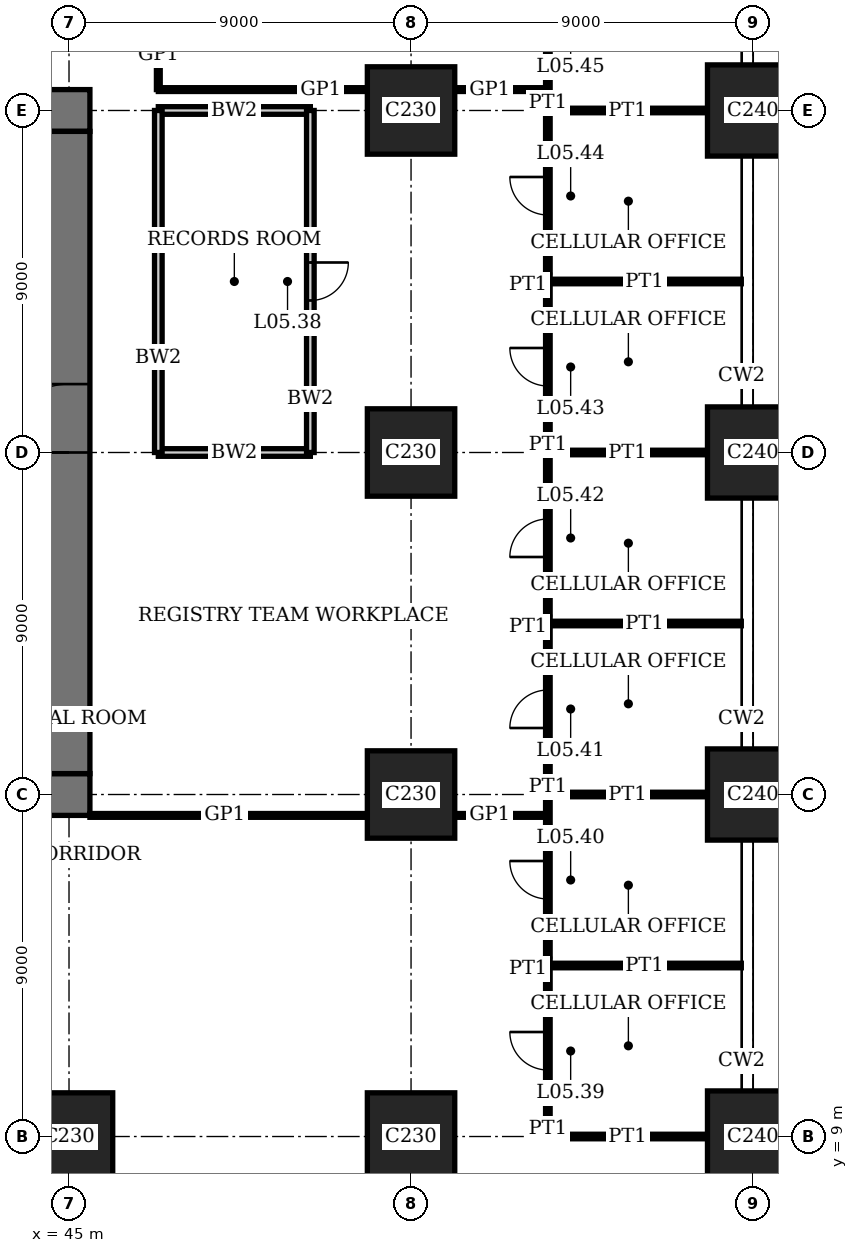
"""IFC4 building model, lengths in metres.
Left out: names, types, materials, properties, quantities, classifications, styles, units other than length and angle.
Written with IfcOpenShell. Run it as: python <this file> out.ifc"""

import sys

from ifc_helpers import new_model, si_unit, direction, frame, frame_2d, origin, origin_2d, place, context, subcontext, project, spatial, rectangle, extrude, element, fill, save


model = new_model("IFC4")
c1 = context("Model", 3, precision=1e-05, world=origin(), true_north=direction((0.0, 1.0)))
c2 = subcontext(c1, "Body", "Model", "MODEL_VIEW")
j1 = project(units=[si_unit("LENGTHUNIT", "METRE"), si_unit("PLANEANGLEUNIT", "RADIAN")], contexts=[c1])
p1 = place(None, origin())
s1 = spatial("IfcSite", under=j1, at=p1, CompositionType="ELEMENT")
p2 = place(p1, origin())
s2 = spatial("IfcBuilding", under=s1, at=p2, CompositionType="ELEMENT")
p3 = place(p2, frame((0.0, 0.0, 23.8)))
s3 = spatial("IfcBuildingStorey", under=s2, at=p3, CompositionType="ELEMENT", Elevation=23.8)
for number, where, z_axis, x_axis in (
    (1, (45.0, 9.0, 0.0), (0.0, 0.0, 1.0), (1.0, 0.0, 0.0)),
    (2, (54.0, 9.0, 0.0), (0.0, 0.0, 1.0), (1.0, 0.0, 0.0)),
    (3, (54.0, 18.0, 0.0), (0.0, 0.0, 1.0), (1.0, 0.0, 0.0)),
    (4, (54.0, 27.0, 0.0), (0.0, 0.0, 1.0), (1.0, 0.0, 0.0)),
    (5, (54.0, 36.0, 0.0), (0.0, 0.0, 1.0), (1.0, 0.0, 0.0)),
):
    element("IfcColumn", number, at=place(p3, frame(where, z_axis=z_axis, x_axis=x_axis)), inside=s3, PredefinedType="COLUMN", context=c2, shape_type="SweptSolid", body=[
        extrude(rectangle(XDim=2.3, YDim=2.3, at=origin_2d()), origin(), (0.0, 0.0, 1.0), 4.0),
    ])
for number, where, z_axis, x_axis in (
    (6, (63.0, 9.0, 0.0), (0.0, 0.0, 1.0), (1.0, 0.0, 0.0)),
    (7, (63.0, 18.0, 0.0), (0.0, 0.0, 1.0), (1.0, 0.0, 0.0)),
    (8, (63.0, 27.0, 0.0), (0.0, 0.0, 1.0), (1.0, 0.0, 0.0)),
    (9, (63.0, 36.0, 0.0), (0.0, 0.0, 1.0), (1.0, 0.0, 0.0)),
):
    element("IfcColumn", number, at=place(p3, frame(where, z_axis=z_axis, x_axis=x_axis)), inside=s3, PredefinedType="COLUMN", context=c2, shape_type="SweptSolid", body=[
        extrude(rectangle(XDim=2.4, YDim=2.4, at=origin_2d()), origin(), (0.0, 0.0, 1.0), 4.0),
    ])
p4 = place(p3, frame((17.45, 18.0, 0.0), z_axis=(0.0, 0.0, 1.0), x_axis=(1.0, 0.0, 0.0)))
e10 = element("IfcWall", 10, at=p4, inside=s3, PredefinedType="SHEAR", context=c2, shape_type="SweptSolid", body=[
    extrude(rectangle(XDim=28.1, YDim=1.1, at=frame_2d((14.05, 0.0))), origin(), (0.0, 0.0, 1.0), 4.0),
])
p5 = place(p4, frame((11.55, 0.0, 0.0)))
e11 = element("IfcOpeningElement", 11, at=p5, cuts=e10, PredefinedType="OPENING", context=c2, shape_type="SweptSolid", body=[
    extrude(rectangle(XDim=1.0, YDim=2.4, at=frame_2d((0.5, 1.2))), frame((0.0, 0.56, 0.0), z_axis=(0.0, -1.0, 0.0), x_axis=(1.0, 0.0, 0.0)), (0.0, 0.0, 1.0), 1.12),
])
p6 = place(p4, frame((16.55, 0.0, 0.0)))
e12 = element("IfcOpeningElement", 12, at=p6, cuts=e10, PredefinedType="OPENING", context=c2, shape_type="SweptSolid", body=[
    extrude(rectangle(XDim=1.0, YDim=2.4, at=frame_2d((0.5, 1.2))), frame((0.0, 0.56, 0.0), z_axis=(0.0, -1.0, 0.0), x_axis=(1.0, 0.0, 0.0)), (0.0, 0.0, 1.0), 1.12),
])
p7 = place(p4, frame((20.0, 0.0, 0.0)))
e13 = element("IfcOpeningElement", 13, at=p7, cuts=e10, PredefinedType="OPENING", context=c2, shape_type="SweptSolid", body=[
    extrude(rectangle(XDim=1.1, YDim=2.4, at=frame_2d((0.55, 1.2))), frame((0.0, 0.56, 0.0), z_axis=(0.0, -1.0, 0.0), x_axis=(1.0, 0.0, 0.0)), (0.0, 0.0, 1.0), 1.12),
])
p8 = place(p4, frame((24.05, 0.0, 0.0)))
e14 = element("IfcOpeningElement", 14, at=p8, cuts=e10, PredefinedType="OPENING", context=c2, shape_type="SweptSolid", body=[
    extrude(rectangle(XDim=1.0, YDim=2.4, at=frame_2d((0.5, 1.2))), frame((0.0, 0.56, 0.0), z_axis=(0.0, -1.0, 0.0), x_axis=(1.0, 0.0, 0.0)), (0.0, 0.0, 1.0), 1.12),
])
p9 = place(p3, frame((45.55, 36.0, 0.0), z_axis=(0.0, 0.0, 1.0), x_axis=(-1.0, 0.0, 0.0)))
e15 = element("IfcWall", 15, at=p9, inside=s3, PredefinedType="SHEAR", context=c2, shape_type="SweptSolid", body=[
    extrude(rectangle(XDim=28.1, YDim=1.1, at=frame_2d((14.05, 0.0))), origin(), (0.0, 0.0, 1.0), 4.0),
])
p10 = place(p9, frame((11.55, 0.0, 0.0)))
e16 = element("IfcOpeningElement", 16, at=p10, cuts=e15, PredefinedType="OPENING", context=c2, shape_type="SweptSolid", body=[
    extrude(rectangle(XDim=1.0, YDim=2.4, at=frame_2d((0.5, 1.2))), frame((0.0, 0.56, 0.0), z_axis=(0.0, -1.0, 0.0), x_axis=(1.0, 0.0, 0.0)), (0.0, 0.0, 1.0), 1.12),
])
p11 = place(p9, frame((16.55, 0.0, 0.0)))
e17 = element("IfcOpeningElement", 17, at=p11, cuts=e15, PredefinedType="OPENING", context=c2, shape_type="SweptSolid", body=[
    extrude(rectangle(XDim=1.0, YDim=2.4, at=frame_2d((0.5, 1.2))), frame((0.0, 0.56, 0.0), z_axis=(0.0, -1.0, 0.0), x_axis=(1.0, 0.0, 0.0)), (0.0, 0.0, 1.0), 1.12),
])
p12 = place(p9, frame((20.0, 0.0, 0.0)))
e18 = element("IfcOpeningElement", 18, at=p12, cuts=e15, PredefinedType="OPENING", context=c2, shape_type="SweptSolid", body=[
    extrude(rectangle(XDim=1.1, YDim=2.4, at=frame_2d((0.55, 1.2))), frame((0.0, 0.56, 0.0), z_axis=(0.0, -1.0, 0.0), x_axis=(1.0, 0.0, 0.0)), (0.0, 0.0, 1.0), 1.12),
])
p13 = place(p9, frame((24.05, 0.0, 0.0)))
e19 = element("IfcOpeningElement", 19, at=p13, cuts=e15, PredefinedType="OPENING", context=c2, shape_type="SweptSolid", body=[
    extrude(rectangle(XDim=1.0, YDim=2.4, at=frame_2d((0.5, 1.2))), frame((0.0, 0.56, 0.0), z_axis=(0.0, -1.0, 0.0), x_axis=(1.0, 0.0, 0.0)), (0.0, 0.0, 1.0), 1.12),
])
p14 = place(p3, frame((45.0, 18.55, 0.0), z_axis=(0.0, 0.0, 1.0), x_axis=(0.0, 1.0, 0.0)))
e20 = element("IfcWall", 20, at=p14, inside=s3, PredefinedType="SHEAR", context=c2, shape_type="SweptSolid", body=[
    extrude(rectangle(XDim=16.9, YDim=1.1, at=frame_2d((8.45, 0.0))), origin(), (0.0, 0.0, 1.0), 4.0),
])
p15 = place(p14, frame((8.45, 0.0, 0.0)))
e21 = element("IfcOpeningElement", 21, at=p15, cuts=e20, PredefinedType="OPENING", context=c2, shape_type="SweptSolid", body=[
    extrude(rectangle(XDim=1.8, YDim=2.4, at=frame_2d((0.9, 1.2))), frame((0.0, 0.56, 0.0), z_axis=(0.0, -1.0, 0.0), x_axis=(1.0, 0.0, 0.0)), (0.0, 0.0, 1.0), 1.12),
])
p16 = place(p3, frame((57.6, 9.0, 0.0), z_axis=(0.0, 0.0, 1.0), x_axis=(1.0, 0.0, 0.0)))
e22 = element("IfcWall", 22, at=p16, inside=s3, PredefinedType="PARTITIONING", context=c2, shape_type="SweptSolid", body=[
    extrude(rectangle(XDim=4.2, YDim=0.12, at=frame_2d((2.1, 0.0))), origin(), (0.0, 0.0, 1.0), 3.05),
])
p17 = place(p3, frame((57.6, 13.5, 0.0), z_axis=(0.0, 0.0, 1.0), x_axis=(1.0, 0.0, 0.0)))
e23 = element("IfcWall", 23, at=p17, inside=s3, PredefinedType="PARTITIONING", context=c2, shape_type="SweptSolid", body=[
    extrude(rectangle(XDim=5.09, YDim=0.12, at=frame_2d((2.545, 0.0))), origin(), (0.0, 0.0, 1.0), 3.1),
])
p18 = place(p3, frame((45.55, 17.45, 0.0), z_axis=(0.0, 0.0, 1.0), x_axis=(1.0, 0.0, 0.0)))
e24 = element("IfcWall", 24, at=p18, inside=s3, PredefinedType="PARTITIONING", context=c2, shape_type="SweptSolid", body=[
    extrude(rectangle(XDim=7.3, YDim=0.1, at=frame_2d((3.65, 0.0))), origin(), (0.0, 0.0, 1.0), 3.75),
])
p19 = place(p3, frame((55.15, 17.45, 0.0), z_axis=(0.0, 0.0, 1.0), x_axis=(1.0, 0.0, 0.0)))
e25 = element("IfcWall", 25, at=p19, inside=s3, PredefinedType="PARTITIONING", context=c2, shape_type="SweptSolid", body=[
    extrude(rectangle(XDim=2.46, YDim=0.1, at=frame_2d((1.23, 0.0))), origin(), (0.0, 0.0, 1.0), 3.75),
])
p20 = place(p3, frame((57.6, 18.0, 0.0), z_axis=(0.0, 0.0, 1.0), x_axis=(1.0, 0.0, 0.0)))
e26 = element("IfcWall", 26, at=p20, inside=s3, PredefinedType="PARTITIONING", context=c2, shape_type="SweptSolid", body=[
    extrude(rectangle(XDim=4.2, YDim=0.12, at=frame_2d((2.1, 0.0))), origin(), (0.0, 0.0, 1.0), 3.05),
])
p21 = place(p3, frame((57.6, 22.5, 0.0), z_axis=(0.0, 0.0, 1.0), x_axis=(1.0, 0.0, 0.0)))
e27 = element("IfcWall", 27, at=p21, inside=s3, PredefinedType="PARTITIONING", context=c2, shape_type="SweptSolid", body=[
    extrude(rectangle(XDim=5.09, YDim=0.12, at=frame_2d((2.545, 0.0))), origin(), (0.0, 0.0, 1.0), 3.1),
])
p22 = place(p3, frame((47.35, 27.0, 0.0), z_axis=(0.0, 0.0, 1.0), x_axis=(1.0, 0.0, 0.0)))
e28 = element("IfcWall", 28, at=p22, inside=s3, PredefinedType="SOLIDWALL", context=c2, shape_type="SweptSolid", body=[
    extrude(rectangle(XDim=4.0, YDim=0.2, at=frame_2d((2.0, 0.0))), origin(), (0.0, 0.0, 1.0), 3.05),
])
p23 = place(p3, frame((57.6, 27.0, 0.0), z_axis=(0.0, 0.0, 1.0), x_axis=(1.0, 0.0, 0.0)))
e29 = element("IfcWall", 29, at=p23, inside=s3, PredefinedType="PARTITIONING", context=c2, shape_type="SweptSolid", body=[
    extrude(rectangle(XDim=4.2, YDim=0.12, at=frame_2d((2.1, 0.0))), origin(), (0.0, 0.0, 1.0), 3.05),
])
p24 = place(p3, frame((57.6, 31.5, 0.0), z_axis=(0.0, 0.0, 1.0), x_axis=(1.0, 0.0, 0.0)))
e30 = element("IfcWall", 30, at=p24, inside=s3, PredefinedType="PARTITIONING", context=c2, shape_type="SweptSolid", body=[
    extrude(rectangle(XDim=5.09, YDim=0.12, at=frame_2d((2.545, 0.0))), origin(), (0.0, 0.0, 1.0), 3.1),
])
p25 = place(p3, frame((47.35, 36.0, 0.0), z_axis=(0.0, 0.0, 1.0), x_axis=(1.0, 0.0, 0.0)))
e31 = element("IfcWall", 31, at=p25, inside=s3, PredefinedType="SOLIDWALL", context=c2, shape_type="SweptSolid", body=[
    extrude(rectangle(XDim=4.0, YDim=0.2, at=frame_2d((2.0, 0.0))), origin(), (0.0, 0.0, 1.0), 3.05),
])
p26 = place(p3, frame((57.6, 36.0, 0.0), z_axis=(0.0, 0.0, 1.0), x_axis=(1.0, 0.0, 0.0)))
e32 = element("IfcWall", 32, at=p26, inside=s3, PredefinedType="PARTITIONING", context=c2, shape_type="SweptSolid", body=[
    extrude(rectangle(XDim=4.2, YDim=0.12, at=frame_2d((2.1, 0.0))), origin(), (0.0, 0.0, 1.0), 3.05),
])
p27 = place(p3, frame((47.35, 36.55, 0.0), z_axis=(0.0, 0.0, 1.0), x_axis=(1.0, 0.0, 0.0)))
e33 = element("IfcWall", 33, at=p27, inside=s3, PredefinedType="PARTITIONING", context=c2, shape_type="SweptSolid", body=[
    extrude(rectangle(XDim=5.5, YDim=0.1, at=frame_2d((2.75, 0.0))), origin(), (0.0, 0.0, 1.0), 3.75),
])
p28 = place(p3, frame((55.15, 36.55, 0.0), z_axis=(0.0, 0.0, 1.0), x_axis=(1.0, 0.0, 0.0)))
e34 = element("IfcWall", 34, at=p28, inside=s3, PredefinedType="PARTITIONING", context=c2, shape_type="SweptSolid", body=[
    extrude(rectangle(XDim=2.46, YDim=0.1, at=frame_2d((1.23, 0.0))), origin(), (0.0, 0.0, 1.0), 3.75),
])
p29 = place(p3, frame((47.35, 27.0, 0.0), z_axis=(0.0, 0.0, 1.0), x_axis=(0.0, 1.0, 0.0)))
e35 = element("IfcWall", 35, at=p29, inside=s3, PredefinedType="SOLIDWALL", context=c2, shape_type="SweptSolid", body=[
    extrude(rectangle(XDim=9.0, YDim=0.2, at=frame_2d((4.5, 0.0))), origin(), (0.0, 0.0, 1.0), 3.75),
])
p30 = place(p3, frame((47.35, 36.55, 0.0), z_axis=(0.0, 0.0, 1.0), x_axis=(0.0, 1.0, 0.0)))
e36 = element("IfcWall", 36, at=p30, inside=s3, PredefinedType="PARTITIONING", context=c2, shape_type="SweptSolid", body=[
    extrude(rectangle(XDim=1.8, YDim=0.1, at=frame_2d((0.9, 0.0))), origin(), (0.0, 0.0, 1.0), 3.75),
])
p31 = place(p3, frame((51.35, 27.0, 0.0), z_axis=(0.0, 0.0, 1.0), x_axis=(0.0, 1.0, 0.0)))
e37 = element("IfcWall", 37, at=p31, inside=s3, PredefinedType="SOLIDWALL", context=c2, shape_type="SweptSolid", body=[
    extrude(rectangle(XDim=9.0, YDim=0.2, at=frame_2d((4.5, 0.0))), origin(), (0.0, 0.0, 1.0), 3.75),
])
p32 = place(p31, frame((4.0, 0.0, 0.0)))
e38 = element("IfcOpeningElement", 38, at=p32, cuts=e37, PredefinedType="OPENING", context=c2, shape_type="SweptSolid", body=[
    extrude(rectangle(XDim=1.0, YDim=2.4, at=frame_2d((0.5, 1.2))), frame((0.0, 0.11, 0.0), z_axis=(0.0, -1.0, 0.0), x_axis=(1.0, 0.0, 0.0)), (0.0, 0.0, 1.0), 0.22),
])
p33 = place(p3, frame((57.6, 9.0, 0.0), z_axis=(0.0, 0.0, 1.0), x_axis=(0.0, 1.0, 0.0)))
e39 = element("IfcWall", 39, at=p33, inside=s3, PredefinedType="PARTITIONING", context=c2, shape_type="SweptSolid", body=[
    extrude(rectangle(XDim=4.5, YDim=0.12, at=frame_2d((2.25, 0.0))), origin(), (0.0, 0.0, 1.0), 3.75),
])
p34 = place(p33, frame((1.75, 0.0, 0.0)))
e40 = element("IfcOpeningElement", 40, at=p34, cuts=e39, PredefinedType="OPENING", context=c2, shape_type="SweptSolid", body=[
    extrude(rectangle(XDim=1.0, YDim=2.4, at=frame_2d((0.5, 1.2))), frame((0.0, 0.07, 0.0), z_axis=(0.0, -1.0, 0.0), x_axis=(1.0, 0.0, 0.0)), (0.0, 0.0, 1.0), 0.14),
])
p35 = place(p3, frame((57.6, 13.5, 0.0), z_axis=(0.0, 0.0, 1.0), x_axis=(0.0, 1.0, 0.0)))
e41 = element("IfcWall", 41, at=p35, inside=s3, PredefinedType="PARTITIONING", context=c2, shape_type="SweptSolid", body=[
    extrude(rectangle(XDim=4.5, YDim=0.12, at=frame_2d((2.25, 0.0))), origin(), (0.0, 0.0, 1.0), 3.75),
])
p36 = place(p35, frame((1.75, 0.0, 0.0)))
e42 = element("IfcOpeningElement", 42, at=p36, cuts=e41, PredefinedType="OPENING", context=c2, shape_type="SweptSolid", body=[
    extrude(rectangle(XDim=1.0, YDim=2.4, at=frame_2d((0.5, 1.2))), frame((0.0, 0.07, 0.0), z_axis=(0.0, -1.0, 0.0), x_axis=(1.0, 0.0, 0.0)), (0.0, 0.0, 1.0), 0.14),
])
p37 = place(p3, frame((57.6, 18.0, 0.0), z_axis=(0.0, 0.0, 1.0), x_axis=(0.0, 1.0, 0.0)))
e43 = element("IfcWall", 43, at=p37, inside=s3, PredefinedType="PARTITIONING", context=c2, shape_type="SweptSolid", body=[
    extrude(rectangle(XDim=4.5, YDim=0.12, at=frame_2d((2.25, 0.0))), origin(), (0.0, 0.0, 1.0), 3.75),
])
p38 = place(p37, frame((1.75, 0.0, 0.0)))
e44 = element("IfcOpeningElement", 44, at=p38, cuts=e43, PredefinedType="OPENING", context=c2, shape_type="SweptSolid", body=[
    extrude(rectangle(XDim=1.0, YDim=2.4, at=frame_2d((0.5, 1.2))), frame((0.0, 0.07, 0.0), z_axis=(0.0, -1.0, 0.0), x_axis=(1.0, 0.0, 0.0)), (0.0, 0.0, 1.0), 0.14),
])
p39 = place(p3, frame((57.6, 22.5, 0.0), z_axis=(0.0, 0.0, 1.0), x_axis=(0.0, 1.0, 0.0)))
e45 = element("IfcWall", 45, at=p39, inside=s3, PredefinedType="PARTITIONING", context=c2, shape_type="SweptSolid", body=[
    extrude(rectangle(XDim=4.5, YDim=0.12, at=frame_2d((2.25, 0.0))), origin(), (0.0, 0.0, 1.0), 3.75),
])
p40 = place(p39, frame((1.75, 0.0, 0.0)))
e46 = element("IfcOpeningElement", 46, at=p40, cuts=e45, PredefinedType="OPENING", context=c2, shape_type="SweptSolid", body=[
    extrude(rectangle(XDim=1.0, YDim=2.4, at=frame_2d((0.5, 1.2))), frame((0.0, 0.07, 0.0), z_axis=(0.0, -1.0, 0.0), x_axis=(1.0, 0.0, 0.0)), (0.0, 0.0, 1.0), 0.14),
])
p41 = place(p3, frame((57.6, 27.0, 0.0), z_axis=(0.0, 0.0, 1.0), x_axis=(0.0, 1.0, 0.0)))
e47 = element("IfcWall", 47, at=p41, inside=s3, PredefinedType="PARTITIONING", context=c2, shape_type="SweptSolid", body=[
    extrude(rectangle(XDim=4.5, YDim=0.12, at=frame_2d((2.25, 0.0))), origin(), (0.0, 0.0, 1.0), 3.75),
])
p42 = place(p41, frame((1.75, 0.0, 0.0)))
e48 = element("IfcOpeningElement", 48, at=p42, cuts=e47, PredefinedType="OPENING", context=c2, shape_type="SweptSolid", body=[
    extrude(rectangle(XDim=1.0, YDim=2.4, at=frame_2d((0.5, 1.2))), frame((0.0, 0.07, 0.0), z_axis=(0.0, -1.0, 0.0), x_axis=(1.0, 0.0, 0.0)), (0.0, 0.0, 1.0), 0.14),
])
p43 = place(p3, frame((57.6, 31.5, 0.0), z_axis=(0.0, 0.0, 1.0), x_axis=(0.0, 1.0, 0.0)))
e49 = element("IfcWall", 49, at=p43, inside=s3, PredefinedType="PARTITIONING", context=c2, shape_type="SweptSolid", body=[
    extrude(rectangle(XDim=4.5, YDim=0.12, at=frame_2d((2.25, 0.0))), origin(), (0.0, 0.0, 1.0), 3.75),
])
p44 = place(p43, frame((1.75, 0.0, 0.0)))
e50 = element("IfcOpeningElement", 50, at=p44, cuts=e49, PredefinedType="OPENING", context=c2, shape_type="SweptSolid", body=[
    extrude(rectangle(XDim=1.0, YDim=2.4, at=frame_2d((0.5, 1.2))), frame((0.0, 0.07, 0.0), z_axis=(0.0, -1.0, 0.0), x_axis=(1.0, 0.0, 0.0)), (0.0, 0.0, 1.0), 0.14),
])
p45 = place(p3, frame((57.6, 36.0, 0.0), z_axis=(0.0, 0.0, 1.0), x_axis=(0.0, 1.0, 0.0)))
e51 = element("IfcWall", 51, at=p45, inside=s3, PredefinedType="PARTITIONING", context=c2, shape_type="SweptSolid", body=[
    extrude(rectangle(XDim=4.5, YDim=0.12, at=frame_2d((2.25, 0.0))), origin(), (0.0, 0.0, 1.0), 3.75),
])
p46 = place(p45, frame((1.75, 0.0, 0.0)))
e52 = element("IfcOpeningElement", 52, at=p46, cuts=e51, PredefinedType="OPENING", context=c2, shape_type="SweptSolid", body=[
    extrude(rectangle(XDim=1.0, YDim=2.4, at=frame_2d((0.5, 1.2))), frame((0.0, 0.07, 0.0), z_axis=(0.0, -1.0, 0.0), x_axis=(1.0, 0.0, 0.0)), (0.0, 0.0, 1.0), 0.14),
])
p47 = place(p15, origin())
e53 = element("IfcDoor", 53, at=p47, inside=s3, OperationType="DOUBLE_DOOR_DOUBLE_SWING", PredefinedType="DOOR", context=c2, shape_type="SweptSolid", body=[
    extrude(rectangle(XDim=1.8, YDim=2.4, at=frame_2d((0.9, 1.2))), frame((0.0, 0.03, 0.0), z_axis=(0.0, -1.0, 0.0), x_axis=(1.0, 0.0, 0.0)), (0.0, 0.0, 1.0), 0.06),
    extrude(rectangle(XDim=0.04, YDim=2.4, at=frame_2d((0.02, 1.2))), frame((0.0, 0.55, 0.0), z_axis=(0.0, -1.0, 0.0), x_axis=(1.0, 0.0, 0.0)), (0.0, 0.0, 1.0), 1.1),
    extrude(rectangle(XDim=0.04, YDim=2.4, at=frame_2d((1.78, 1.2))), frame((0.0, 0.55, 0.0), z_axis=(0.0, -1.0, 0.0), x_axis=(1.0, 0.0, 0.0)), (0.0, 0.0, 1.0), 1.1),
    extrude(rectangle(XDim=1.8, YDim=0.04, at=frame_2d((0.9, 2.38))), frame((0.0, 0.55, 0.0), z_axis=(0.0, -1.0, 0.0), x_axis=(1.0, 0.0, 0.0)), (0.0, 0.0, 1.0), 1.1),
])
fill(e21, e53)
p48 = place(p32, origin())
e54 = element("IfcDoor", 54, at=p48, inside=s3, OperationType="SINGLE_SWING_RIGHT", PredefinedType="DOOR", context=c2, shape_type="SweptSolid", body=[
    extrude(rectangle(XDim=1.0, YDim=2.4, at=frame_2d((0.5, 1.2))), frame((0.0, 0.035, 0.0), z_axis=(0.0, -1.0, 0.0), x_axis=(1.0, 0.0, 0.0)), (0.0, 0.0, 1.0), 0.07),
])
fill(e38, e54)
p49 = place(p34, origin())
e55 = element("IfcDoor", 55, at=p49, inside=s3, OperationType="SINGLE_SWING_LEFT", PredefinedType="DOOR", context=c2, shape_type="SweptSolid", body=[
    extrude(rectangle(XDim=1.0, YDim=2.4, at=frame_2d((0.5, 1.2))), frame((0.0, 0.025, 0.0), z_axis=(0.0, -1.0, 0.0), x_axis=(1.0, 0.0, 0.0)), (0.0, 0.0, 1.0), 0.05),
])
fill(e40, e55)
p50 = place(p36, origin())
e56 = element("IfcDoor", 56, at=p50, inside=s3, OperationType="SINGLE_SWING_LEFT", PredefinedType="DOOR", context=c2, shape_type="SweptSolid", body=[
    extrude(rectangle(XDim=1.0, YDim=2.4, at=frame_2d((0.5, 1.2))), frame((0.0, 0.025, 0.0), z_axis=(0.0, -1.0, 0.0), x_axis=(1.0, 0.0, 0.0)), (0.0, 0.0, 1.0), 0.05),
])
fill(e42, e56)
p51 = place(p38, origin())
e57 = element("IfcDoor", 57, at=p51, inside=s3, OperationType="SINGLE_SWING_RIGHT", PredefinedType="DOOR", context=c2, shape_type="SweptSolid", body=[
    extrude(rectangle(XDim=1.0, YDim=2.4, at=frame_2d((0.5, 1.2))), frame((0.0, 0.025, 0.0), z_axis=(0.0, -1.0, 0.0), x_axis=(1.0, 0.0, 0.0)), (0.0, 0.0, 1.0), 0.05),
])
fill(e44, e57)
p52 = place(p40, origin())
e58 = element("IfcDoor", 58, at=p52, inside=s3, OperationType="SINGLE_SWING_RIGHT", PredefinedType="DOOR", context=c2, shape_type="SweptSolid", body=[
    extrude(rectangle(XDim=1.0, YDim=2.4, at=frame_2d((0.5, 1.2))), frame((0.0, 0.025, 0.0), z_axis=(0.0, -1.0, 0.0), x_axis=(1.0, 0.0, 0.0)), (0.0, 0.0, 1.0), 0.05),
])
fill(e46, e58)
p53 = place(p42, origin())
e59 = element("IfcDoor", 59, at=p53, inside=s3, OperationType="SINGLE_SWING_LEFT", PredefinedType="DOOR", context=c2, shape_type="SweptSolid", body=[
    extrude(rectangle(XDim=1.0, YDim=2.4, at=frame_2d((0.5, 1.2))), frame((0.0, 0.025, 0.0), z_axis=(0.0, -1.0, 0.0), x_axis=(1.0, 0.0, 0.0)), (0.0, 0.0, 1.0), 0.05),
])
fill(e48, e59)
p54 = place(p44, origin())
e60 = element("IfcDoor", 60, at=p54, inside=s3, OperationType="SINGLE_SWING_LEFT", PredefinedType="DOOR", context=c2, shape_type="SweptSolid", body=[
    extrude(rectangle(XDim=1.0, YDim=2.4, at=frame_2d((0.5, 1.2))), frame((0.0, 0.025, 0.0), z_axis=(0.0, -1.0, 0.0), x_axis=(1.0, 0.0, 0.0)), (0.0, 0.0, 1.0), 0.05),
])
fill(e50, e60)
save(model, sys.argv[1])
